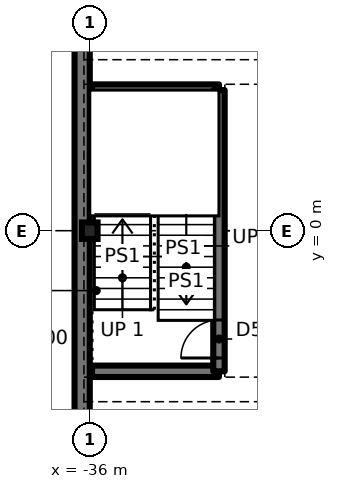
"""IFC4 building model, lengths in metres.
Left out: names, types, materials, properties, quantities, classifications, styles, units other than length and angle.
Written with IfcOpenShell. Run it as: python <this file> out.ifc"""

import sys

from ifc_helpers import new_model, si_unit, direction, frame, frame_2d, origin, origin_2d, place, context, subcontext, project, spatial, rectangle, i_section, extrude, element, fill, save


model = new_model("IFC4")
c1 = context("Model", 3, precision=1e-05, world=origin(), true_north=direction((0.0, 1.0)))
c2 = subcontext(c1, "Body", "Model", "MODEL_VIEW")
j1 = project(units=[si_unit("LENGTHUNIT", "METRE"), si_unit("PLANEANGLEUNIT", "RADIAN")], contexts=[c1])
p1 = place(None, origin())
s1 = spatial("IfcSite", under=j1, at=p1, CompositionType="ELEMENT")
p2 = place(p1, origin())
s2 = spatial("IfcBuilding", under=s1, at=p2, CompositionType="ELEMENT")
p3 = place(p2, frame((0.0, 0.0, -7.2)))
s3 = spatial("IfcBuildingStorey", under=s2, at=p3, CompositionType="ELEMENT", Elevation=-7.2)
p4 = place(p3, frame((-36.0, 0.0, -0.25), z_axis=(0.0, 0.0, 1.0), x_axis=(1.0, 0.0, 0.0)))
e1 = element("IfcColumn", 1, at=p4, inside=s3, PredefinedType="COLUMN", context=c2, shape_type="SweptSolid", body=[
    extrude(i_section(OverallWidth=0.411, OverallDepth=0.434, WebThickness=0.036, FlangeThickness=0.057, at=origin_2d()), origin(), (0.0, 0.0, 1.0), 3.85),
])
p5 = place(p3, frame((-36.2, 35.8, 0.0), z_axis=(0.0, 0.0, 1.0), x_axis=(0.0, -1.0, 0.0)))
e2 = element("IfcWall", 2, at=p5, inside=s3, PredefinedType="SOLIDWALL", context=c2, shape_type="SweptSolid", body=[
    extrude(rectangle(XDim=71.6, YDim=0.4, at=frame_2d((35.8, 0.0))), origin(), (0.0, 0.0, 1.0), 3.6),
])
for number, where, z_axis, x_axis in (
    (3, (-35.94, -3.7, -0.25), (0.0, 0.0, 1.0), (1.0, 0.0, 0.0)),
    (4, (-35.94, 3.7, -0.25), (0.0, 0.0, 1.0), (1.0, 0.0, 0.0)),
):
    element("IfcWall", number, at=place(p3, frame(where, z_axis=z_axis, x_axis=x_axis)), inside=s3, PredefinedType="SOLIDWALL", context=c2, shape_type="SweptSolid", body=[
        extrude(rectangle(XDim=3.34, YDim=0.3, at=frame_2d((1.67, 0.0))), origin(), (0.0, 0.0, 1.0), 3.85),
    ])
p6 = place(p3, frame((-32.6, -3.7, -0.25), z_axis=(0.0, 0.0, 1.0), x_axis=(0.0, 1.0, 0.0)))
e5 = element("IfcWall", 5, at=p6, inside=s3, PredefinedType="SOLIDWALL", context=c2, shape_type="SweptSolid", body=[
    extrude(rectangle(XDim=7.4, YDim=0.3, at=frame_2d((3.7, 0.0))), origin(), (0.0, 0.0, 1.0), 3.85),
])
p7 = place(p6, frame((0.35, 0.0, 0.25)))
e6 = element("IfcOpeningElement", 6, at=p7, cuts=e5, PredefinedType="OPENING", context=c2, shape_type="SweptSolid", body=[
    extrude(rectangle(XDim=1.0, YDim=2.1, at=frame_2d((0.5, 1.05))), frame((0.0, 0.16, 0.0), z_axis=(0.0, -1.0, 0.0), x_axis=(1.0, 0.0, 0.0)), (0.0, 0.0, 1.0), 0.32),
])
p8 = place(p7, origin())
e7 = element("IfcDoor", 7, at=p8, inside=s3, OperationType="SINGLE_SWING_LEFT", PredefinedType="DOOR", context=c2, shape_type="SweptSolid", body=[
    extrude(rectangle(XDim=1.0, YDim=2.1, at=frame_2d((0.5, 1.05))), frame((0.0, 0.025, 0.0), z_axis=(0.0, -1.0, 0.0), x_axis=(1.0, 0.0, 0.0)), (0.0, 0.0, 1.0), 0.05),
])
fill(e6, e7)
save(model, sys.argv[1])
